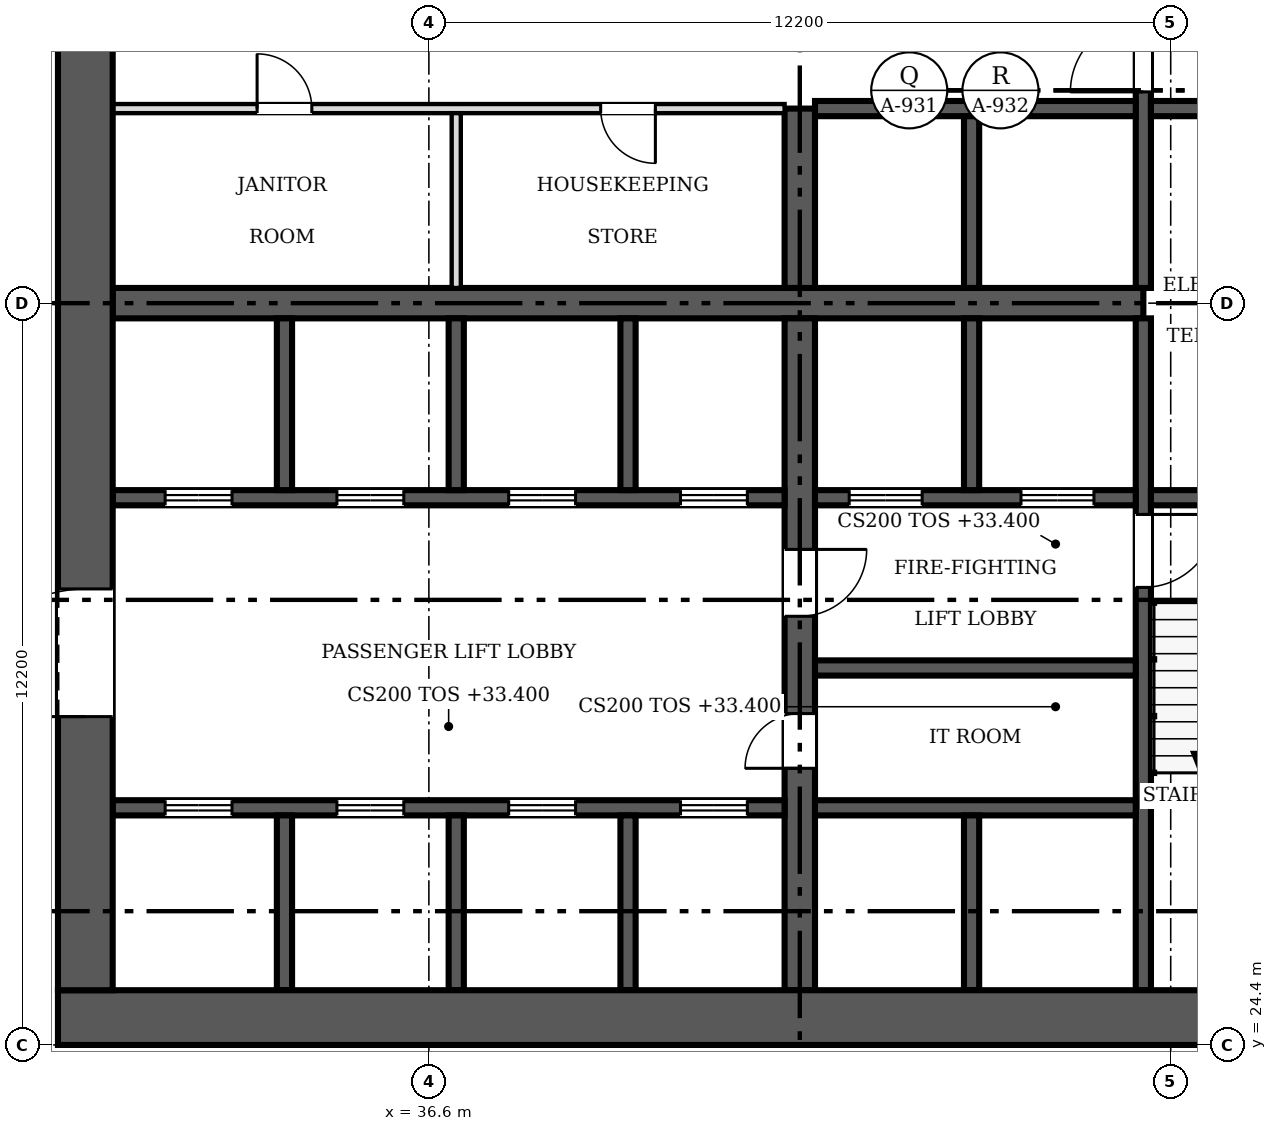
"""IFC4 building model, lengths in metres.
Left out: names, types, materials, properties, quantities, classifications, styles, units other than length and angle.
Written with IfcOpenShell. Run it as: python <this file> out.ifc"""

import sys

from ifc_helpers import new_model, si_unit, direction, frame, frame_2d, origin, place, context, subcontext, project, spatial, rectangle, extrude, source, transform, mapped, element, fill, save


model = new_model("IFC4")
c1 = context("Model", 3, precision=1e-05, world=origin(), true_north=direction((0.0, 1.0)))
c2 = subcontext(c1, "Body", "Model", "MODEL_VIEW")
j1 = project(units=[si_unit("LENGTHUNIT", "METRE"), si_unit("PLANEANGLEUNIT", "RADIAN")], contexts=[c1])
p1 = place(None, origin())
s1 = spatial("IfcSite", under=j1, at=p1, CompositionType="ELEMENT")
p2 = place(p1, origin())
s2 = spatial("IfcBuilding", under=s1, at=p2, CompositionType="ELEMENT")
p3 = place(p2, frame((0.0, 0.0, 33.4)))
s3 = spatial("IfcBuildingStorey", under=s2, at=p3, CompositionType="ELEMENT", Elevation=33.4)
p4 = place(p3, frame((54.9, 24.85, 0.0), z_axis=(0.0, 0.0, 1.0), x_axis=(-1.0, 0.0, 0.0)))
e1 = element("IfcWall", 1, at=p4, inside=s3, PredefinedType="SHEAR", context=c2, shape_type="SweptSolid", body=[
    extrude(rectangle(XDim=24.4, YDim=0.9, at=frame_2d((12.2, 0.0))), origin(), (0.0, 0.0, 1.0), 3.8),
])
m1 = source(origin(), c2, "Body", "SweptSolid", [
    extrude(rectangle(XDim=1.2, YDim=2.1, at=frame_2d((0.6, 1.05))), frame((0.0, 0.46, 0.0), z_axis=(0.0, -1.0, 0.0), x_axis=(1.0, 0.0, 0.0)), (0.0, 0.0, 1.0), 0.92),
])
p5 = place(p4, frame((1.5, 0.0, 0.0)))
e2 = element("IfcOpeningElement", 2, at=p5, cuts=e1, PredefinedType="OPENING", context=c2, shape_type="MappedRepresentation", body=[
    mapped(m1, transform((0.0, 0.0, 0.0), scale=1.0)),
])
p6 = place(p3, frame((30.95, 25.3, 0.0), z_axis=(0.0, 0.0, 1.0), x_axis=(0.0, 1.0, 0.0)))
e3 = element("IfcWall", 3, at=p6, inside=s3, PredefinedType="SHEAR", context=c2, shape_type="SweptSolid", body=[
    extrude(rectangle(XDim=22.6, YDim=0.9, at=frame_2d((11.3, 0.0))), origin(), (0.0, 0.0, 1.0), 3.8),
])
m2 = source(origin(), c2, "Body", "SweptSolid", [
    extrude(rectangle(XDim=2.1, YDim=2.4, at=frame_2d((1.05, 1.2))), frame((0.0, 0.46, 0.0), z_axis=(0.0, -1.0, 0.0), x_axis=(1.0, 0.0, 0.0)), (0.0, 0.0, 1.0), 0.92),
])
p7 = place(p6, frame((4.5, 0.0, 0.0)))
e4 = element("IfcOpeningElement", 4, at=p7, cuts=e3, PredefinedType="OPENING", context=c2, shape_type="MappedRepresentation", body=[
    mapped(m2, transform((0.0, 0.0, 0.0), scale=1.0)),
])
p8 = place(p6, frame((16.0, 0.0, 0.0)))
e5 = element("IfcOpeningElement", 5, at=p8, cuts=e3, PredefinedType="OPENING", context=c2, shape_type="MappedRepresentation", body=[
    mapped(m2, transform((0.0, 0.0, 0.0), scale=1.0)),
])
p9 = place(p3, frame((31.4, 36.6, 0.0), z_axis=(0.0, 0.0, 1.0), x_axis=(1.0, 0.0, 0.0)))
e6 = element("IfcWall", 6, at=p9, inside=s3, PredefinedType="SHEAR", context=c2, shape_type="SweptSolid", body=[
    extrude(rectangle(XDim=16.95, YDim=0.5, at=frame_2d((8.475, 0.0))), origin(), (0.0, 0.0, 1.0), 3.8),
])
p10 = place(p3, frame((42.7, 36.35, 0.0), z_axis=(0.0, 0.0, 1.0), x_axis=(0.0, -1.0, 0.0)))
e7 = element("IfcWall", 7, at=p10, inside=s3, PredefinedType="SHEAR", context=c2, shape_type="SweptSolid", body=[
    extrude(rectangle(XDim=11.05, YDim=0.5, at=frame_2d((5.525, 0.0))), origin(), (0.0, 0.0, 1.0), 3.8),
])
m3 = source(origin(), c2, "Body", "SweptSolid", [
    extrude(rectangle(XDim=0.9, YDim=2.1, at=frame_2d((0.45, 1.05))), frame((0.0, 0.26, 0.0), z_axis=(0.0, -1.0, 0.0), x_axis=(1.0, 0.0, 0.0)), (0.0, 0.0, 1.0), 0.52),
])
p11 = place(p10, frame((6.5, 0.0, 0.0)))
e8 = element("IfcOpeningElement", 8, at=p11, cuts=e7, PredefinedType="OPENING", context=c2, shape_type="MappedRepresentation", body=[
    mapped(m3, transform((0.0, 0.0, 0.0), scale=1.0)),
])
m4 = source(origin(), c2, "Body", "SweptSolid", [
    extrude(rectangle(XDim=1.1, YDim=2.1, at=frame_2d((0.55, 1.05))), frame((0.0, 0.26, 0.0), z_axis=(0.0, -1.0, 0.0), x_axis=(1.0, 0.0, 0.0)), (0.0, 0.0, 1.0), 0.52),
])
p12 = place(p10, frame((3.8, 0.0, 0.0)))
e9 = element("IfcOpeningElement", 9, at=p12, cuts=e7, PredefinedType="OPENING", context=c2, shape_type="MappedRepresentation", body=[
    mapped(m4, transform((0.0, 0.0, 0.0), scale=1.0)),
])
p13 = place(p3, frame((42.7, 36.85, 0.0), z_axis=(0.0, 0.0, 1.0), x_axis=(0.0, 1.0, 0.0)))
e10 = element("IfcWall", 10, at=p13, inside=s3, PredefinedType="SHEAR", context=c2, shape_type="SweptSolid", body=[
    extrude(rectangle(XDim=2.95, YDim=0.5, at=frame_2d((1.475, 0.0))), origin(), (0.0, 0.0, 1.0), 3.8),
])
p14 = place(p3, frame((48.35, 36.35, 0.0), z_axis=(0.0, 0.0, 1.0), x_axis=(0.0, -1.0, 0.0)))
e11 = element("IfcWall", 11, at=p14, inside=s3, PredefinedType="SOLIDWALL", context=c2, shape_type="SweptSolid", body=[
    extrude(rectangle(XDim=11.05, YDim=0.25, at=frame_2d((5.525, 0.0))), origin(), (0.0, 0.0, 1.0), 3.8),
])
m5 = source(origin(), c2, "Body", "SweptSolid", [
    extrude(rectangle(XDim=1.2, YDim=2.1, at=frame_2d((0.6, 1.05))), frame((0.0, 0.135, 0.0), z_axis=(0.0, -1.0, 0.0), x_axis=(1.0, 0.0, 0.0)), (0.0, 0.0, 1.0), 0.27),
])
p15 = place(p14, frame((3.225, 0.0, 0.0)))
e12 = element("IfcOpeningElement", 12, at=p15, cuts=e11, PredefinedType="OPENING", context=c2, shape_type="MappedRepresentation", body=[
    mapped(m5, transform((0.0, 0.0, 0.0), scale=1.0)),
])
p16 = place(p3, frame((48.35, 47.9, 0.0), z_axis=(0.0, 0.0, 1.0), x_axis=(0.0, -1.0, 0.0)))
e13 = element("IfcWall", 13, at=p16, inside=s3, PredefinedType="SOLIDWALL", context=c2, shape_type="SweptSolid", body=[
    extrude(rectangle(XDim=11.05, YDim=0.25, at=frame_2d((5.525, 0.0))), origin(), (0.0, 0.0, 1.0), 3.8),
])
p17 = place(p16, frame((6.625, 0.0, 0.0)))
e14 = element("IfcOpeningElement", 14, at=p17, cuts=e13, PredefinedType="OPENING", context=c2, shape_type="MappedRepresentation", body=[
    mapped(m5, transform((0.0, 0.0, 0.0), scale=1.0)),
])
p18 = place(p3, frame((42.45, 33.4, 0.0), z_axis=(0.0, 0.0, 1.0), x_axis=(-1.0, 0.0, 0.0)))
e15 = element("IfcWall", 15, at=p18, inside=s3, PredefinedType="SOLIDWALL", context=c2, shape_type="SweptSolid", body=[
    extrude(rectangle(XDim=11.05, YDim=0.25, at=frame_2d((5.525, 0.0))), origin(), (0.0, 0.0, 1.0), 3.8),
])
m6 = source(origin(), c2, "Body", "SweptSolid", [
    extrude(rectangle(XDim=1.1, YDim=2.1, at=frame_2d((0.55, 1.05))), frame((0.0, 0.135, 0.0), z_axis=(0.0, -1.0, 0.0), x_axis=(1.0, 0.0, 0.0)), (0.0, 0.0, 1.0), 0.27),
])
p19 = place(p18, frame((9.087, 0.0, 0.0)))
e16 = element("IfcOpeningElement", 16, at=p19, cuts=e15, PredefinedType="OPENING", context=c2, shape_type="MappedRepresentation", body=[
    mapped(m6, transform((0.0, 0.0, 0.0), scale=1.0)),
])
p20 = place(p18, frame((6.262, 0.0, 0.0)))
e17 = element("IfcOpeningElement", 17, at=p20, cuts=e15, PredefinedType="OPENING", context=c2, shape_type="MappedRepresentation", body=[
    mapped(m6, transform((0.0, 0.0, 0.0), scale=1.0)),
])
p21 = place(p18, frame((3.438, 0.0, 0.0)))
e18 = element("IfcOpeningElement", 18, at=p21, cuts=e15, PredefinedType="OPENING", context=c2, shape_type="MappedRepresentation", body=[
    mapped(m6, transform((0.0, 0.0, 0.0), scale=1.0)),
])
p22 = place(p18, frame((0.613, 0.0, 0.0)))
e19 = element("IfcOpeningElement", 19, at=p22, cuts=e15, PredefinedType="OPENING", context=c2, shape_type="MappedRepresentation", body=[
    mapped(m6, transform((0.0, 0.0, 0.0), scale=1.0)),
])
p23 = place(p3, frame((48.225, 33.4, 0.0), z_axis=(0.0, 0.0, 1.0), x_axis=(-1.0, 0.0, 0.0)))
e20 = element("IfcWall", 20, at=p23, inside=s3, PredefinedType="SOLIDWALL", context=c2, shape_type="SweptSolid", body=[
    extrude(rectangle(XDim=5.275, YDim=0.25, at=frame_2d((2.638, 0.0))), origin(), (0.0, 0.0, 1.0), 3.8),
])
p24 = place(p23, frame((3.512, 0.0, 0.0)))
e21 = element("IfcOpeningElement", 21, at=p24, cuts=e20, PredefinedType="OPENING", context=c2, shape_type="MappedRepresentation", body=[
    mapped(m5, transform((0.0, 0.0, 0.0), scale=1.0)),
])
p25 = place(p23, frame((0.688, 0.0, 0.0)))
e22 = element("IfcOpeningElement", 22, at=p25, cuts=e20, PredefinedType="OPENING", context=c2, shape_type="MappedRepresentation", body=[
    mapped(m5, transform((0.0, 0.0, 0.0), scale=1.0)),
])
p26 = place(p3, frame((48.475, 33.4, 0.0), z_axis=(0.0, 0.0, 1.0), x_axis=(1.0, 0.0, 0.0)))
e23 = element("IfcWall", 23, at=p26, inside=s3, PredefinedType="SOLIDWALL", context=c2, shape_type="SweptSolid", body=[
    extrude(rectangle(XDim=3.525, YDim=0.25, at=frame_2d((1.762, 0.0))), origin(), (0.0, 0.0, 1.0), 3.8),
])
p27 = place(p3, frame((31.4, 28.3, 0.0), z_axis=(0.0, 0.0, 1.0), x_axis=(1.0, 0.0, 0.0)))
e24 = element("IfcWall", 24, at=p27, inside=s3, PredefinedType="SOLIDWALL", context=c2, shape_type="SweptSolid", body=[
    extrude(rectangle(XDim=11.05, YDim=0.25, at=frame_2d((5.525, 0.0))), origin(), (0.0, 0.0, 1.0), 3.8),
])
p28 = place(p27, frame((0.863, 0.0, 0.0)))
e25 = element("IfcOpeningElement", 25, at=p28, cuts=e24, PredefinedType="OPENING", context=c2, shape_type="MappedRepresentation", body=[
    mapped(m6, transform((0.0, 0.0, 0.0), scale=1.0)),
])
p29 = place(p27, frame((3.688, 0.0, 0.0)))
e26 = element("IfcOpeningElement", 26, at=p29, cuts=e24, PredefinedType="OPENING", context=c2, shape_type="MappedRepresentation", body=[
    mapped(m6, transform((0.0, 0.0, 0.0), scale=1.0)),
])
p30 = place(p27, frame((6.512, 0.0, 0.0)))
e27 = element("IfcOpeningElement", 27, at=p30, cuts=e24, PredefinedType="OPENING", context=c2, shape_type="MappedRepresentation", body=[
    mapped(m6, transform((0.0, 0.0, 0.0), scale=1.0)),
])
p31 = place(p27, frame((9.337, 0.0, 0.0)))
e28 = element("IfcOpeningElement", 28, at=p31, cuts=e24, PredefinedType="OPENING", context=c2, shape_type="MappedRepresentation", body=[
    mapped(m6, transform((0.0, 0.0, 0.0), scale=1.0)),
])
for number, where, z_axis, x_axis in (
    (29, (42.95, 28.3, 0.0), (0.0, 0.0, 1.0), (1.0, 0.0, 0.0)),
    (30, (42.95, 39.8, 0.0), (0.0, 0.0, 1.0), (1.0, 0.0, 0.0)),
):
    element("IfcWall", number, at=place(p3, frame(where, z_axis=z_axis, x_axis=x_axis)), inside=s3, PredefinedType="SOLIDWALL", context=c2, shape_type="SweptSolid", body=[
        extrude(rectangle(XDim=5.275, YDim=0.25, at=frame_2d((2.638, 0.0))), origin(), (0.0, 0.0, 1.0), 3.8),
    ])
p32 = place(p3, frame((48.475, 39.8, 0.0), z_axis=(0.0, 0.0, 1.0), x_axis=(1.0, 0.0, 0.0)))
e31 = element("IfcWall", 31, at=p32, inside=s3, PredefinedType="SOLIDWALL", context=c2, shape_type="SweptSolid", body=[
    extrude(rectangle(XDim=3.525, YDim=0.25, at=frame_2d((1.762, 0.0))), origin(), (0.0, 0.0, 1.0), 3.8),
])
p33 = place(p3, frame((45.525, 33.525, 0.0), z_axis=(0.0, 0.0, 1.0), x_axis=(0.0, 1.0, 0.0)))
e32 = element("IfcWall", 32, at=p33, inside=s3, PredefinedType="SOLIDWALL", context=c2, shape_type="SweptSolid", body=[
    extrude(rectangle(XDim=2.825, YDim=0.25, at=frame_2d((1.413, 0.0))), origin(), (0.0, 0.0, 1.0), 3.8),
])
p34 = place(p3, frame((45.525, 36.85, 0.0), z_axis=(0.0, 0.0, 1.0), x_axis=(0.0, 1.0, 0.0)))
e33 = element("IfcWall", 33, at=p34, inside=s3, PredefinedType="SOLIDWALL", context=c2, shape_type="SweptSolid", body=[
    extrude(rectangle(XDim=2.825, YDim=0.25, at=frame_2d((1.413, 0.0))), origin(), (0.0, 0.0, 1.0), 3.8),
])
p35 = place(p3, frame((42.95, 30.6, 0.0), z_axis=(0.0, 0.0, 1.0), x_axis=(1.0, 0.0, 0.0)))
e34 = element("IfcWall", 34, at=p35, inside=s3, PredefinedType="SOLIDWALL", context=c2, shape_type="SweptSolid", body=[
    extrude(rectangle(XDim=5.275, YDim=0.25, at=frame_2d((2.638, 0.0))), origin(), (0.0, 0.0, 1.0), 3.8),
])
for number, where, z_axis, x_axis in (
    (35, (34.225, 33.525, 0.0), (0.0, 0.0, 1.0), (0.0, 1.0, 0.0)),
    (36, (37.05, 33.525, 0.0), (0.0, 0.0, 1.0), (0.0, 1.0, 0.0)),
    (37, (39.875, 33.525, 0.0), (0.0, 0.0, 1.0), (0.0, 1.0, 0.0)),
):
    element("IfcWall", number, at=place(p3, frame(where, z_axis=z_axis, x_axis=x_axis)), inside=s3, PredefinedType="SOLIDWALL", context=c2, shape_type="SweptSolid", body=[
        extrude(rectangle(XDim=2.825, YDim=0.25, at=frame_2d((1.413, 0.0))), origin(), (0.0, 0.0, 1.0), 3.8),
    ])
for number, where, z_axis, x_axis in (
    (38, (34.225, 25.3, 0.0), (0.0, 0.0, 1.0), (0.0, 1.0, 0.0)),
    (39, (37.05, 25.3, 0.0), (0.0, 0.0, 1.0), (0.0, 1.0, 0.0)),
    (40, (39.875, 25.3, 0.0), (0.0, 0.0, 1.0), (0.0, 1.0, 0.0)),
    (41, (45.525, 25.3, 0.0), (0.0, 0.0, 1.0), (0.0, 1.0, 0.0)),
):
    element("IfcWall", number, at=place(p3, frame(where, z_axis=z_axis, x_axis=x_axis)), inside=s3, PredefinedType="SOLIDWALL", context=c2, shape_type="SweptSolid", body=[
        extrude(rectangle(XDim=2.875, YDim=0.25, at=frame_2d((1.438, 0.0))), origin(), (0.0, 0.0, 1.0), 3.8),
    ])
p36 = place(p3, frame((42.45, 39.8, 0.0), z_axis=(0.0, 0.0, 1.0), x_axis=(-1.0, 0.0, 0.0)))
e42 = element("IfcWall", 42, at=p36, inside=s3, PredefinedType="PARTITIONING", context=c2, shape_type="SweptSolid", body=[
    extrude(rectangle(XDim=11.05, YDim=0.15, at=frame_2d((5.525, 0.0))), origin(), (0.0, 0.0, 1.0), 3.6),
])
m7 = source(origin(), c2, "Body", "SweptSolid", [
    extrude(rectangle(XDim=0.9, YDim=2.1, at=frame_2d((0.45, 1.05))), frame((0.0, 0.085, 0.0), z_axis=(0.0, -1.0, 0.0), x_axis=(1.0, 0.0, 0.0)), (0.0, 0.0, 1.0), 0.17),
])
p37 = place(p36, frame((7.775, 0.0, 0.0)))
e43 = element("IfcOpeningElement", 43, at=p37, cuts=e42, PredefinedType="OPENING", context=c2, shape_type="MappedRepresentation", body=[
    mapped(m7, transform((0.0, 0.0, 0.0), scale=1.0)),
])
p38 = place(p36, frame((2.125, 0.0, 0.0)))
e44 = element("IfcOpeningElement", 44, at=p38, cuts=e42, PredefinedType="OPENING", context=c2, shape_type="MappedRepresentation", body=[
    mapped(m7, transform((0.0, 0.0, 0.0), scale=1.0)),
])
p39 = place(p3, frame((37.05, 36.85, 0.0), z_axis=(0.0, 0.0, 1.0), x_axis=(0.0, 1.0, 0.0)))
e45 = element("IfcWall", 45, at=p39, inside=s3, PredefinedType="PARTITIONING", context=c2, shape_type="SweptSolid", body=[
    extrude(rectangle(XDim=2.875, YDim=0.15, at=frame_2d((1.438, 0.0))), origin(), (0.0, 0.0, 1.0), 3.6),
])
m8 = source(origin(), c2, "Body", "SweptSolid", [
    extrude(rectangle(XDim=2.1, YDim=2.4, at=frame_2d((1.05, 1.2))), frame((0.0, 0.025, 0.0), z_axis=(0.0, -1.0, 0.0), x_axis=(1.0, 0.0, 0.0)), (0.0, 0.0, 1.0), 0.05),
])
p40 = place(p7, origin())
e46 = element("IfcDoor", 46, at=p40, inside=s3, OperationType="DOUBLE_DOOR_SINGLE_SWING", PredefinedType="DOOR", context=c2, shape_type="MappedRepresentation", body=[
    mapped(m8, transform((0.0, 0.0, 0.0), scale=1.0)),
])
fill(e4, e46)
m9 = source(origin(), c2, "Body", "SweptSolid", [
    extrude(rectangle(XDim=0.9, YDim=2.1, at=frame_2d((0.45, 1.05))), frame((0.0, 0.025, 0.0), z_axis=(0.0, -1.0, 0.0), x_axis=(1.0, 0.0, 0.0)), (0.0, 0.0, 1.0), 0.05),
])
p41 = place(p11, origin())
e47 = element("IfcDoor", 47, at=p41, inside=s3, OperationType="SINGLE_SWING_RIGHT", PredefinedType="DOOR", context=c2, shape_type="MappedRepresentation", body=[
    mapped(m9, transform((0.0, 0.0, 0.0), scale=1.0)),
])
fill(e8, e47)
m10 = source(origin(), c2, "Body", "SweptSolid", [
    extrude(rectangle(XDim=1.1, YDim=2.1, at=frame_2d((0.55, 1.05))), frame((0.0, 0.025, 0.0), z_axis=(0.0, -1.0, 0.0), x_axis=(1.0, 0.0, 0.0)), (0.0, 0.0, 1.0), 0.05),
])
p42 = place(p12, origin())
e48 = element("IfcDoor", 48, at=p42, inside=s3, OperationType="SINGLE_SWING_LEFT", PredefinedType="DOOR", context=c2, shape_type="MappedRepresentation", body=[
    mapped(m10, transform((0.0, 0.0, 0.0), scale=1.0)),
])
fill(e9, e48)
m11 = source(origin(), c2, "Body", "SweptSolid", [
    extrude(rectangle(XDim=1.2, YDim=2.1, at=frame_2d((0.6, 1.05))), frame((0.0, 0.025, 0.0), z_axis=(0.0, -1.0, 0.0), x_axis=(1.0, 0.0, 0.0)), (0.0, 0.0, 1.0), 0.05),
])
p43 = place(p15, origin())
e49 = element("IfcDoor", 49, at=p43, inside=s3, OperationType="SINGLE_SWING_LEFT", PredefinedType="DOOR", context=c2, shape_type="MappedRepresentation", body=[
    mapped(m11, transform((0.0, 0.0, 0.0), scale=1.0)),
])
fill(e12, e49)
p44 = place(p17, origin())
e50 = element("IfcDoor", 50, at=p44, inside=s3, OperationType="SINGLE_SWING_RIGHT", PredefinedType="DOOR", context=c2, shape_type="MappedRepresentation", body=[
    mapped(m11, transform((0.0, 0.0, 0.0), scale=1.0)),
])
fill(e14, e50)
p45 = place(p19, origin())
e51 = element("IfcDoor", 51, at=p45, inside=s3, OperationType="DOUBLE_DOOR_SLIDING", PredefinedType="DOOR", context=c2, shape_type="MappedRepresentation", body=[
    mapped(m10, transform((0.0, 0.0, 0.0), scale=1.0)),
])
fill(e16, e51)
p46 = place(p20, origin())
e52 = element("IfcDoor", 52, at=p46, inside=s3, OperationType="DOUBLE_DOOR_SLIDING", PredefinedType="DOOR", context=c2, shape_type="MappedRepresentation", body=[
    mapped(m10, transform((0.0, 0.0, 0.0), scale=1.0)),
])
fill(e17, e52)
p47 = place(p21, origin())
e53 = element("IfcDoor", 53, at=p47, inside=s3, OperationType="DOUBLE_DOOR_SLIDING", PredefinedType="DOOR", context=c2, shape_type="MappedRepresentation", body=[
    mapped(m10, transform((0.0, 0.0, 0.0), scale=1.0)),
])
fill(e18, e53)
p48 = place(p22, origin())
e54 = element("IfcDoor", 54, at=p48, inside=s3, OperationType="DOUBLE_DOOR_SLIDING", PredefinedType="DOOR", context=c2, shape_type="MappedRepresentation", body=[
    mapped(m10, transform((0.0, 0.0, 0.0), scale=1.0)),
])
fill(e19, e54)
p49 = place(p24, origin())
e55 = element("IfcDoor", 55, at=p49, inside=s3, OperationType="DOUBLE_DOOR_SLIDING", PredefinedType="DOOR", context=c2, shape_type="MappedRepresentation", body=[
    mapped(m11, transform((0.0, 0.0, 0.0), scale=1.0)),
])
fill(e21, e55)
p50 = place(p25, origin())
e56 = element("IfcDoor", 56, at=p50, inside=s3, OperationType="DOUBLE_DOOR_SLIDING", PredefinedType="DOOR", context=c2, shape_type="MappedRepresentation", body=[
    mapped(m11, transform((0.0, 0.0, 0.0), scale=1.0)),
])
fill(e22, e56)
p51 = place(p28, origin())
e57 = element("IfcDoor", 57, at=p51, inside=s3, OperationType="DOUBLE_DOOR_SLIDING", PredefinedType="DOOR", context=c2, shape_type="MappedRepresentation", body=[
    mapped(m10, transform((0.0, 0.0, 0.0), scale=1.0)),
])
fill(e25, e57)
p52 = place(p29, origin())
e58 = element("IfcDoor", 58, at=p52, inside=s3, OperationType="DOUBLE_DOOR_SLIDING", PredefinedType="DOOR", context=c2, shape_type="MappedRepresentation", body=[
    mapped(m10, transform((0.0, 0.0, 0.0), scale=1.0)),
])
fill(e26, e58)
p53 = place(p30, origin())
e59 = element("IfcDoor", 59, at=p53, inside=s3, OperationType="DOUBLE_DOOR_SLIDING", PredefinedType="DOOR", context=c2, shape_type="MappedRepresentation", body=[
    mapped(m10, transform((0.0, 0.0, 0.0), scale=1.0)),
])
fill(e27, e59)
p54 = place(p31, origin())
e60 = element("IfcDoor", 60, at=p54, inside=s3, OperationType="DOUBLE_DOOR_SLIDING", PredefinedType="DOOR", context=c2, shape_type="MappedRepresentation", body=[
    mapped(m10, transform((0.0, 0.0, 0.0), scale=1.0)),
])
fill(e28, e60)
p55 = place(p37, origin())
e61 = element("IfcDoor", 61, at=p55, inside=s3, OperationType="SINGLE_SWING_RIGHT", PredefinedType="DOOR", context=c2, shape_type="MappedRepresentation", body=[
    mapped(m9, transform((0.0, 0.0, 0.0), scale=1.0)),
])
fill(e43, e61)
p56 = place(p38, origin())
e62 = element("IfcDoor", 62, at=p56, inside=s3, OperationType="SINGLE_SWING_LEFT", PredefinedType="DOOR", context=c2, shape_type="MappedRepresentation", body=[
    mapped(m9, transform((0.0, 0.0, 0.0), scale=1.0)),
])
fill(e44, e62)
save(model, sys.argv[1])
